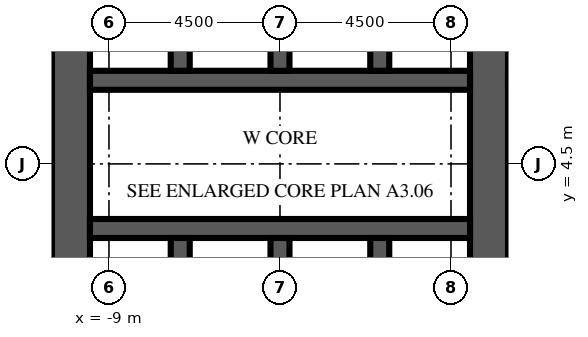
"""IFC4 building model, lengths in metres.
Left out: names, types, materials, properties, quantities, classifications, styles, units other than length and angle.
Written with IfcOpenShell. Run it as: python <this file> out.ifc"""

import sys

from ifc_helpers import new_model, si_unit, direction, frame, frame_2d, origin, place, context, subcontext, project, spatial, rectangle, extrude, element, fill, save


model = new_model("IFC4")
c1 = context("Model", 3, precision=1e-05, world=origin(), true_north=direction((0.0, 1.0)))
c2 = subcontext(c1, "Body", "Model", "MODEL_VIEW")
j1 = project(units=[si_unit("LENGTHUNIT", "METRE"), si_unit("PLANEANGLEUNIT", "RADIAN")], contexts=[c1])
p1 = place(None, origin())
s1 = spatial("IfcSite", under=j1, at=p1, CompositionType="ELEMENT")
p2 = place(p1, origin())
s2 = spatial("IfcBuilding", under=s1, at=p2, CompositionType="ELEMENT")
p3 = place(p2, frame((0.0, 0.0, 31.8)))
s3 = spatial("IfcBuildingStorey", under=s2, at=p3, CompositionType="ELEMENT", Elevation=31.8)
p4 = place(p3, frame((-10.0, -9.0, 0.0), z_axis=(0.0, 0.0, 1.0), x_axis=(0.0, 1.0, 0.0)))
e1 = element("IfcWall", 1, at=p4, inside=s3, PredefinedType="SHEAR", context=c2, shape_type="SweptSolid", body=[
    extrude(rectangle(XDim=27.5, YDim=1.0, at=frame_2d((13.75, 0.0))), origin(), (0.0, 0.0, 1.0), 4.1),
])
p5 = place(p4, frame((12.55, 0.0, 0.0)))
e2 = element("IfcOpeningElement", 2, at=p5, cuts=e1, PredefinedType="OPENING", context=c2, shape_type="SweptSolid", body=[
    extrude(rectangle(XDim=2.4, YDim=2.4, at=frame_2d((1.2, 1.2))), frame((0.0, 0.51, 0.0), z_axis=(0.0, -1.0, 0.0), x_axis=(1.0, 0.0, 0.0)), (0.0, 0.0, 1.0), 1.02),
])
p6 = place(p4, frame((6.825, 0.0, 0.0)))
e3 = element("IfcOpeningElement", 3, at=p6, cuts=e1, PredefinedType="OPENING", context=c2, shape_type="SweptSolid", body=[
    extrude(rectangle(XDim=1.2, YDim=2.1, at=frame_2d((0.6, 1.05))), frame((0.0, 0.51, 0.0), z_axis=(0.0, -1.0, 0.0), x_axis=(1.0, 0.0, 0.0)), (0.0, 0.0, 1.0), 1.02),
])
p7 = place(p4, frame((19.475, 0.0, 0.0)))
e4 = element("IfcOpeningElement", 4, at=p7, cuts=e1, PredefinedType="OPENING", context=c2, shape_type="SweptSolid", body=[
    extrude(rectangle(XDim=1.2, YDim=2.1, at=frame_2d((0.6, 1.05))), frame((0.0, 0.51, 0.0), z_axis=(0.0, -1.0, 0.0), x_axis=(1.0, 0.0, 0.0)), (0.0, 0.0, 1.0), 1.02),
])
p8 = place(p3, frame((1.0, -9.0, 0.0), z_axis=(0.0, 0.0, 1.0), x_axis=(0.0, 1.0, 0.0)))
e5 = element("IfcWall", 5, at=p8, inside=s3, PredefinedType="SHEAR", context=c2, shape_type="SweptSolid", body=[
    extrude(rectangle(XDim=27.5, YDim=1.0, at=frame_2d((13.75, 0.0))), origin(), (0.0, 0.0, 1.0), 4.1),
])
p9 = place(p8, frame((12.55, 0.0, 0.0)))
e6 = element("IfcOpeningElement", 6, at=p9, cuts=e5, PredefinedType="OPENING", context=c2, shape_type="SweptSolid", body=[
    extrude(rectangle(XDim=2.4, YDim=2.4, at=frame_2d((1.2, 1.2))), frame((0.0, 0.51, 0.0), z_axis=(0.0, -1.0, 0.0), x_axis=(1.0, 0.0, 0.0)), (0.0, 0.0, 1.0), 1.02),
])
p10 = place(p8, frame((4.025, 0.0, 0.0)))
e7 = element("IfcOpeningElement", 7, at=p10, cuts=e5, PredefinedType="OPENING", context=c2, shape_type="SweptSolid", body=[
    extrude(rectangle(XDim=1.2, YDim=2.1, at=frame_2d((0.6, 1.05))), frame((0.0, 0.51, 0.0), z_axis=(0.0, -1.0, 0.0), x_axis=(1.0, 0.0, 0.0)), (0.0, 0.0, 1.0), 1.02),
])
p11 = place(p8, frame((19.475, 0.0, 0.0)))
e8 = element("IfcOpeningElement", 8, at=p11, cuts=e5, PredefinedType="OPENING", context=c2, shape_type="SweptSolid", body=[
    extrude(rectangle(XDim=1.0, YDim=2.1, at=frame_2d((0.5, 1.05))), frame((0.0, 0.51, 0.0), z_axis=(0.0, -1.0, 0.0), x_axis=(1.0, 0.0, 0.0)), (0.0, 0.0, 1.0), 1.02),
])
p12 = place(p8, frame((21.106, 0.0, 0.0)))
e9 = element("IfcOpeningElement", 9, at=p12, cuts=e5, PredefinedType="OPENING", context=c2, shape_type="SweptSolid", body=[
    extrude(rectangle(XDim=1.0, YDim=2.1, at=frame_2d((0.5, 1.05))), frame((0.0, 0.51, 0.0), z_axis=(0.0, -1.0, 0.0), x_axis=(1.0, 0.0, 0.0)), (0.0, 0.0, 1.0), 1.02),
])
p13 = place(p8, frame((23.1, 0.0, 0.0)))
e10 = element("IfcOpeningElement", 10, at=p13, cuts=e5, PredefinedType="OPENING", context=c2, shape_type="SweptSolid", body=[
    extrude(rectangle(XDim=1.0, YDim=2.1, at=frame_2d((0.5, 1.05))), frame((0.0, 0.51, 0.0), z_axis=(0.0, -1.0, 0.0), x_axis=(1.0, 0.0, 0.0)), (0.0, 0.0, 1.0), 1.02),
])
p14 = place(p8, frame((25.094, 0.0, 0.0)))
e11 = element("IfcOpeningElement", 11, at=p14, cuts=e5, PredefinedType="OPENING", context=c2, shape_type="SweptSolid", body=[
    extrude(rectangle(XDim=1.0, YDim=2.1, at=frame_2d((0.5, 1.05))), frame((0.0, 0.51, 0.0), z_axis=(0.0, -1.0, 0.0), x_axis=(1.0, 0.0, 0.0)), (0.0, 0.0, 1.0), 1.02),
])
p15 = place(p3, frame((-9.5, 2.8, 0.0), z_axis=(0.0, 0.0, 1.0), x_axis=(1.0, 0.0, 0.0)))
e12 = element("IfcWall", 12, at=p15, inside=s3, PredefinedType="SHEAR", context=c2, shape_type="SweptSolid", body=[
    extrude(rectangle(XDim=10.0, YDim=0.5, at=frame_2d((5.0, 0.0))), origin(), (0.0, 0.0, 1.0), 4.1),
])
p16 = place(p15, frame((0.512, 0.0, 0.0)))
e13 = element("IfcOpeningElement", 13, at=p16, cuts=e12, PredefinedType="OPENING", context=c2, shape_type="SweptSolid", body=[
    extrude(rectangle(XDim=1.1, YDim=2.1, at=frame_2d((0.55, 1.05))), frame((0.0, 0.26, 0.0), z_axis=(0.0, -1.0, 0.0), x_axis=(1.0, 0.0, 0.0)), (0.0, 0.0, 1.0), 0.52),
])
p17 = place(p15, frame((3.137, 0.0, 0.0)))
e14 = element("IfcOpeningElement", 14, at=p17, cuts=e12, PredefinedType="OPENING", context=c2, shape_type="SweptSolid", body=[
    extrude(rectangle(XDim=1.1, YDim=2.1, at=frame_2d((0.55, 1.05))), frame((0.0, 0.26, 0.0), z_axis=(0.0, -1.0, 0.0), x_axis=(1.0, 0.0, 0.0)), (0.0, 0.0, 1.0), 0.52),
])
p18 = place(p15, frame((8.387, 0.0, 0.0)))
e15 = element("IfcOpeningElement", 15, at=p18, cuts=e12, PredefinedType="OPENING", context=c2, shape_type="SweptSolid", body=[
    extrude(rectangle(XDim=1.1, YDim=2.1, at=frame_2d((0.55, 1.05))), frame((0.0, 0.26, 0.0), z_axis=(0.0, -1.0, 0.0), x_axis=(1.0, 0.0, 0.0)), (0.0, 0.0, 1.0), 0.52),
])
p19 = place(p3, frame((-9.5, 6.7, 0.0), z_axis=(0.0, 0.0, 1.0), x_axis=(1.0, 0.0, 0.0)))
e16 = element("IfcWall", 16, at=p19, inside=s3, PredefinedType="SHEAR", context=c2, shape_type="SweptSolid", body=[
    extrude(rectangle(XDim=10.0, YDim=0.5, at=frame_2d((5.0, 0.0))), origin(), (0.0, 0.0, 1.0), 4.1),
])
p20 = place(p19, frame((0.512, 0.0, 0.0)))
e17 = element("IfcOpeningElement", 17, at=p20, cuts=e16, PredefinedType="OPENING", context=c2, shape_type="SweptSolid", body=[
    extrude(rectangle(XDim=1.1, YDim=2.1, at=frame_2d((0.55, 1.05))), frame((0.0, 0.26, 0.0), z_axis=(0.0, -1.0, 0.0), x_axis=(1.0, 0.0, 0.0)), (0.0, 0.0, 1.0), 0.52),
])
p21 = place(p19, frame((3.188, 0.0, 0.0)))
e18 = element("IfcOpeningElement", 18, at=p21, cuts=e16, PredefinedType="OPENING", context=c2, shape_type="SweptSolid", body=[
    extrude(rectangle(XDim=1.0, YDim=2.1, at=frame_2d((0.5, 1.05))), frame((0.0, 0.26, 0.0), z_axis=(0.0, -1.0, 0.0), x_axis=(1.0, 0.0, 0.0)), (0.0, 0.0, 1.0), 0.52),
])
p22 = place(p19, frame((5.812, 0.0, 0.0)))
e19 = element("IfcOpeningElement", 19, at=p22, cuts=e16, PredefinedType="OPENING", context=c2, shape_type="SweptSolid", body=[
    extrude(rectangle(XDim=1.0, YDim=2.1, at=frame_2d((0.5, 1.05))), frame((0.0, 0.26, 0.0), z_axis=(0.0, -1.0, 0.0), x_axis=(1.0, 0.0, 0.0)), (0.0, 0.0, 1.0), 0.52),
])
p23 = place(p19, frame((8.438, 0.0, 0.0)))
e20 = element("IfcOpeningElement", 20, at=p23, cuts=e16, PredefinedType="OPENING", context=c2, shape_type="SweptSolid", body=[
    extrude(rectangle(XDim=1.0, YDim=2.1, at=frame_2d((0.5, 1.05))), frame((0.0, 0.26, 0.0), z_axis=(0.0, -1.0, 0.0), x_axis=(1.0, 0.0, 0.0)), (0.0, 0.0, 1.0), 0.52),
])
for number, where, z_axis, x_axis in (
    (21, (-7.125, -0.25, 0.0), (0.0, 0.0, 1.0), (0.0, 1.0, 0.0)),
    (22, (-7.125, 6.95, 0.0), (0.0, 0.0, 1.0), (0.0, 1.0, 0.0)),
    (23, (-4.5, -0.25, 0.0), (0.0, 0.0, 1.0), (0.0, 1.0, 0.0)),
    (24, (-4.5, 6.95, 0.0), (0.0, 0.0, 1.0), (0.0, 1.0, 0.0)),
    (25, (-1.875, -0.25, 0.0), (0.0, 0.0, 1.0), (0.0, 1.0, 0.0)),
    (26, (-1.875, 6.95, 0.0), (0.0, 0.0, 1.0), (0.0, 1.0, 0.0)),
):
    element("IfcWall", number, at=place(p3, frame(where, z_axis=z_axis, x_axis=x_axis)), inside=s3, PredefinedType="SHEAR", context=c2, shape_type="SweptSolid", body=[
        extrude(rectangle(XDim=2.8, YDim=0.5, at=frame_2d((1.4, 0.0))), origin(), (0.0, 0.0, 1.0), 4.1),
    ])
p24 = place(p16, origin())
e27 = element("IfcDoor", 27, at=p24, inside=s3, OperationType="DOUBLE_DOOR_SLIDING", PredefinedType="DOOR", context=c2, shape_type="SweptSolid", body=[
    extrude(rectangle(XDim=1.1, YDim=2.1, at=frame_2d((0.55, 1.05))), frame((0.0, 0.025, 0.0), z_axis=(0.0, -1.0, 0.0), x_axis=(1.0, 0.0, 0.0)), (0.0, 0.0, 1.0), 0.05),
])
fill(e13, e27)
p25 = place(p17, origin())
e28 = element("IfcDoor", 28, at=p25, inside=s3, OperationType="DOUBLE_DOOR_SLIDING", PredefinedType="DOOR", context=c2, shape_type="SweptSolid", body=[
    extrude(rectangle(XDim=1.1, YDim=2.1, at=frame_2d((0.55, 1.05))), frame((0.0, 0.025, 0.0), z_axis=(0.0, -1.0, 0.0), x_axis=(1.0, 0.0, 0.0)), (0.0, 0.0, 1.0), 0.05),
])
fill(e14, e28)
p26 = place(p18, origin())
e29 = element("IfcDoor", 29, at=p26, inside=s3, OperationType="DOUBLE_DOOR_SLIDING", PredefinedType="DOOR", context=c2, shape_type="SweptSolid", body=[
    extrude(rectangle(XDim=1.1, YDim=2.1, at=frame_2d((0.55, 1.05))), frame((0.0, 0.025, 0.0), z_axis=(0.0, -1.0, 0.0), x_axis=(1.0, 0.0, 0.0)), (0.0, 0.0, 1.0), 0.05),
])
fill(e15, e29)
p27 = place(p20, origin())
e30 = element("IfcDoor", 30, at=p27, inside=s3, OperationType="DOUBLE_DOOR_SLIDING", PredefinedType="DOOR", context=c2, shape_type="SweptSolid", body=[
    extrude(rectangle(XDim=1.1, YDim=2.1, at=frame_2d((0.55, 1.05))), frame((0.0, 0.025, 0.0), z_axis=(0.0, -1.0, 0.0), x_axis=(1.0, 0.0, 0.0)), (0.0, 0.0, 1.0), 0.05),
])
fill(e17, e30)
p28 = place(p5, origin())
e31 = element("IfcDoor", 31, at=p28, inside=s3, OperationType="DOUBLE_DOOR_DOUBLE_SWING", PredefinedType="DOOR", context=c2, shape_type="SweptSolid", body=[
    extrude(rectangle(XDim=2.4, YDim=2.4, at=frame_2d((1.2, 1.2))), frame((0.0, 0.025, 0.0), z_axis=(0.0, -1.0, 0.0), x_axis=(1.0, 0.0, 0.0)), (0.0, 0.0, 1.0), 0.05),
])
fill(e2, e31)
p29 = place(p9, origin())
e32 = element("IfcDoor", 32, at=p29, inside=s3, OperationType="DOUBLE_DOOR_DOUBLE_SWING", PredefinedType="DOOR", context=c2, shape_type="SweptSolid", body=[
    extrude(rectangle(XDim=2.4, YDim=2.4, at=frame_2d((1.2, 1.2))), frame((0.0, 0.025, 0.0), z_axis=(0.0, -1.0, 0.0), x_axis=(1.0, 0.0, 0.0)), (0.0, 0.0, 1.0), 0.05),
])
fill(e6, e32)
p30 = place(p21, origin())
e33 = element("IfcDoor", 33, at=p30, inside=s3, OperationType="SINGLE_SWING_RIGHT", PredefinedType="DOOR", context=c2, shape_type="SweptSolid", body=[
    extrude(rectangle(XDim=1.0, YDim=2.1, at=frame_2d((0.5, 1.05))), frame((0.0, 0.025, 0.0), z_axis=(0.0, -1.0, 0.0), x_axis=(1.0, 0.0, 0.0)), (0.0, 0.0, 1.0), 0.05),
])
fill(e18, e33)
p31 = place(p22, origin())
e34 = element("IfcDoor", 34, at=p31, inside=s3, OperationType="SINGLE_SWING_LEFT", PredefinedType="DOOR", context=c2, shape_type="SweptSolid", body=[
    extrude(rectangle(XDim=1.0, YDim=2.1, at=frame_2d((0.5, 1.05))), frame((0.0, 0.025, 0.0), z_axis=(0.0, -1.0, 0.0), x_axis=(1.0, 0.0, 0.0)), (0.0, 0.0, 1.0), 0.05),
])
fill(e19, e34)
p32 = place(p23, origin())
e35 = element("IfcDoor", 35, at=p32, inside=s3, OperationType="SINGLE_SWING_RIGHT", PredefinedType="DOOR", context=c2, shape_type="SweptSolid", body=[
    extrude(rectangle(XDim=1.0, YDim=2.1, at=frame_2d((0.5, 1.05))), frame((0.0, 0.025, 0.0), z_axis=(0.0, -1.0, 0.0), x_axis=(1.0, 0.0, 0.0)), (0.0, 0.0, 1.0), 0.05),
])
fill(e20, e35)
save(model, sys.argv[1])
